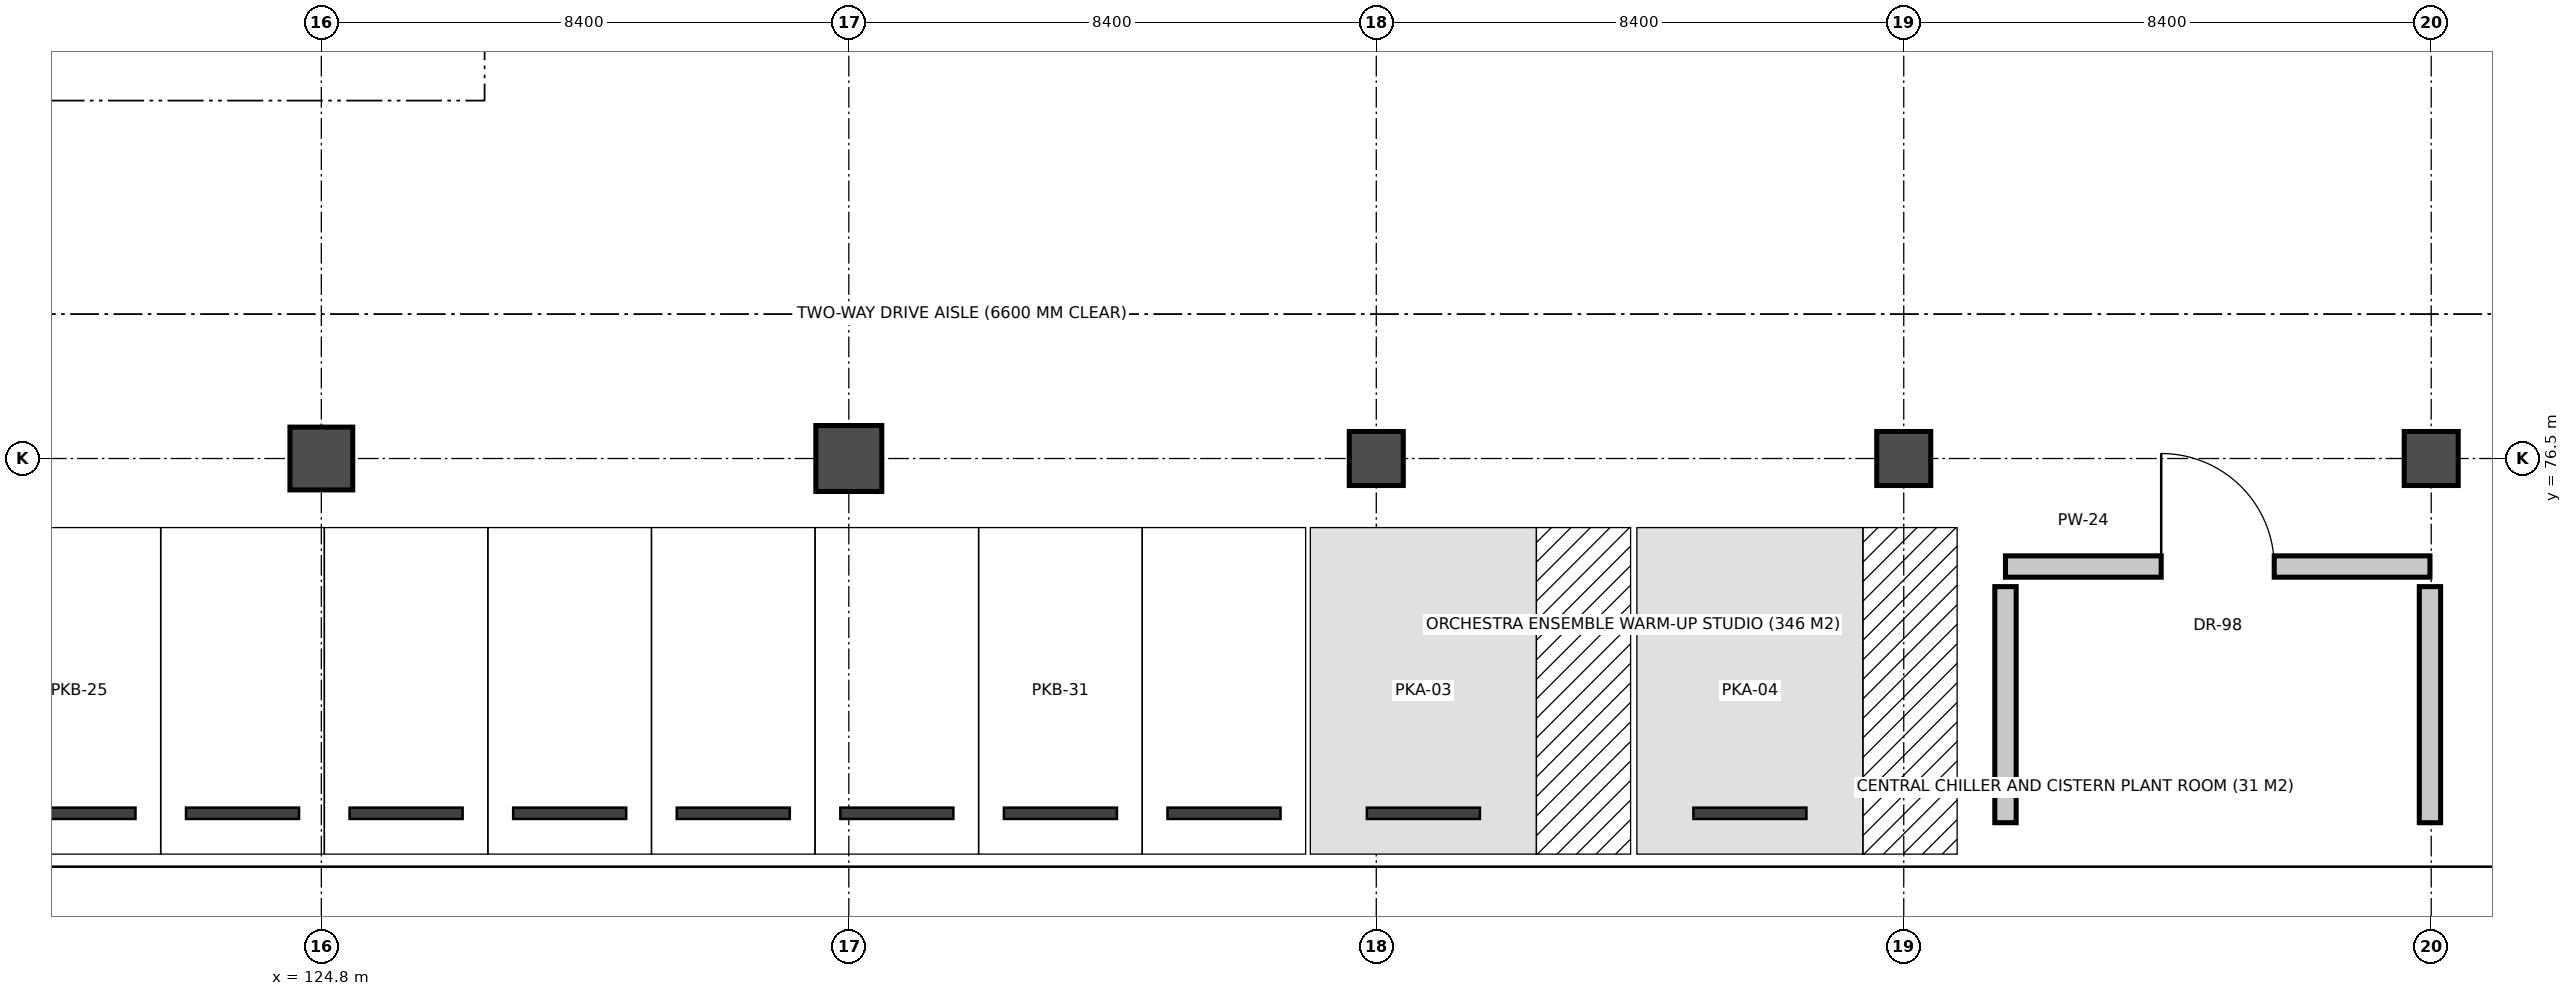
"""IFC4 building model, lengths in metres.
Left out: names, types, materials, properties, quantities, classifications, styles, units other than length and angle.
Written with IfcOpenShell. Run it as: python <this file> out.ifc"""

import sys

from ifc_helpers import new_model, si_unit, direction, frame, frame_2d, origin, origin_2d, place, context, subcontext, project, spatial, rectangle, extrude, element, fill, save


model = new_model("IFC4")
c1 = context("Model", 3, precision=1e-05, world=origin(), true_north=direction((0.0, 1.0)))
c2 = subcontext(c1, "Body", "Model", "MODEL_VIEW")
j1 = project(units=[si_unit("LENGTHUNIT", "METRE"), si_unit("PLANEANGLEUNIT", "RADIAN")], contexts=[c1])
p1 = place(None, origin())
s1 = spatial("IfcSite", under=j1, at=p1, CompositionType="ELEMENT")
p2 = place(p1, origin())
s2 = spatial("IfcBuilding", under=s1, at=p2, CompositionType="ELEMENT")
p3 = place(p2, frame((0.0, 0.0, -5.4)))
s3 = spatial("IfcBuildingStorey", under=s2, at=p3, CompositionType="ELEMENT", Elevation=-5.4)
p4 = place(p3, frame((124.8, 76.5, 0.0), z_axis=(0.0, 0.0, 1.0), x_axis=(1.0, 0.0, 0.0)))
e1 = element("IfcColumn", 1, at=p4, inside=s3, PredefinedType="COLUMN", context=c2, shape_type="SweptSolid", body=[
    extrude(rectangle(XDim=1.0, YDim=1.0, at=origin_2d()), origin(), (0.0, 0.0, 1.0), 5.4),
])
p5 = place(p3, frame((133.2, 76.5, 0.0), z_axis=(0.0, 0.0, 1.0), x_axis=(1.0, 0.0, 0.0)))
e2 = element("IfcColumn", 2, at=p5, inside=s3, PredefinedType="COLUMN", context=c2, shape_type="SweptSolid", body=[
    extrude(rectangle(XDim=1.05, YDim=1.05, at=origin_2d()), origin(), (0.0, 0.0, 1.0), 5.4),
])
for number, where, z_axis, x_axis in (
    (3, (141.6, 76.5, 0.0), (0.0, 0.0, 1.0), (1.0, 0.0, 0.0)),
    (4, (150.0, 76.5, 0.0), (0.0, 0.0, 1.0), (1.0, 0.0, 0.0)),
    (5, (158.4, 76.5, 0.0), (0.0, 0.0, 1.0), (1.0, 0.0, 0.0)),
):
    element("IfcColumn", number, at=place(p3, frame(where, z_axis=z_axis, x_axis=x_axis)), inside=s3, PredefinedType="COLUMN", context=c2, shape_type="SweptSolid", body=[
        extrude(rectangle(XDim=0.86, YDim=0.86, at=origin_2d()), origin(), (0.0, 0.0, 1.0), 5.4),
    ])
p6 = place(p3, frame((151.62, 74.78, 0.0), z_axis=(0.0, 0.0, 1.0), x_axis=(1.0, 0.0, 0.0)))
e6 = element("IfcWall", 6, at=p6, inside=s3, PredefinedType="PARTITIONING", context=c2, shape_type="SweptSolid", body=[
    extrude(rectangle(XDim=6.76, YDim=0.34, at=frame_2d((3.38, 0.0))), origin(), (0.0, 0.0, 1.0), 4.02),
])
p7 = place(p6, frame((2.48, 0.0, 0.0)))
e7 = element("IfcOpeningElement", 7, at=p7, cuts=e6, PredefinedType="OPENING", context=c2, shape_type="SweptSolid", body=[
    extrude(rectangle(XDim=1.8, YDim=2.34, at=frame_2d((0.9, 1.17))), frame((0.0, 0.18, 0.0), z_axis=(0.0, -1.0, 0.0), x_axis=(1.0, 0.0, 0.0)), (0.0, 0.0, 1.0), 0.36),
])
for number, where, z_axis, x_axis in (
    (8, (158.38, 74.46, 0.0), (0.0, 0.0, 1.0), (0.0, -1.0, 0.0)),
    (9, (151.62, 70.7, 0.0), (0.0, 0.0, 1.0), (0.0, 1.0, 0.0)),
):
    element("IfcWall", number, at=place(p3, frame(where, z_axis=z_axis, x_axis=x_axis)), inside=s3, PredefinedType="PARTITIONING", context=c2, shape_type="SweptSolid", body=[
        extrude(rectangle(XDim=3.76, YDim=0.34, at=frame_2d((1.88, 0.0))), origin(), (0.0, 0.0, 1.0), 4.02),
    ])
p8 = place(p7, origin())
e10 = element("IfcDoor", 10, at=p8, inside=s3, OperationType="SINGLE_SWING_LEFT", PredefinedType="DOOR", context=c2, shape_type="SweptSolid", body=[
    extrude(rectangle(XDim=1.8, YDim=2.34, at=frame_2d((0.9, 1.17))), frame((0.0, 0.025, 0.0), z_axis=(0.0, -1.0, 0.0), x_axis=(1.0, 0.0, 0.0)), (0.0, 0.0, 1.0), 0.05),
])
fill(e7, e10)
save(model, sys.argv[1])
